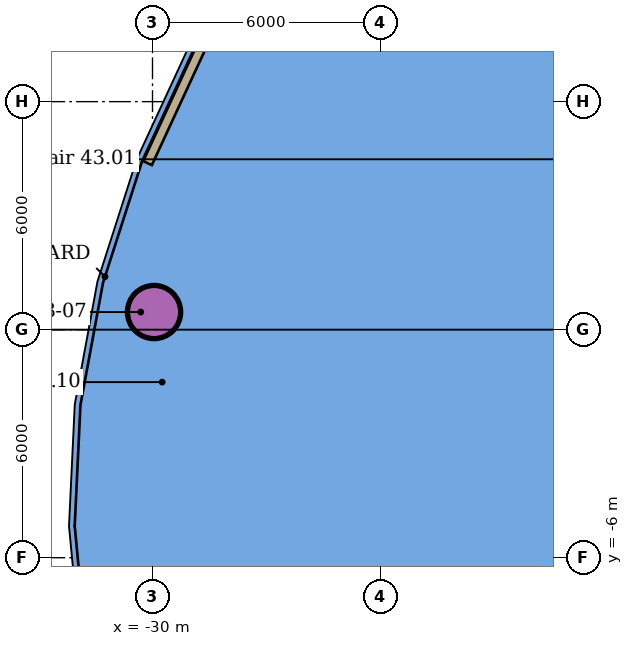
"""IFC4 building model, lengths in metres.
Left out: names, types, materials, properties, quantities, classifications, styles, units other than length and angle.
Written with IfcOpenShell. Run it as: python <this file> out.ifc"""

import sys

from ifc_helpers import new_model, si_unit, direction, frame, frame_2d, origin, origin_2d, place, context, subcontext, project, spatial, rectangle, hollow_circle, extrude, element, save


model = new_model("IFC4")
c1 = context("Model", 3, precision=1e-05, world=origin(), true_north=direction((0.0, 1.0)))
c2 = subcontext(c1, "Body", "Model", "MODEL_VIEW")
j1 = project(units=[si_unit("LENGTHUNIT", "METRE"), si_unit("PLANEANGLEUNIT", "RADIAN")], contexts=[c1])
p1 = place(None, origin())
s1 = spatial("IfcSite", under=j1, at=p1, CompositionType="ELEMENT")
p2 = place(p1, origin())
s2 = spatial("IfcBuilding", under=s1, at=p2, CompositionType="ELEMENT")
p3 = place(p2, frame((0.0, 0.0, 179.4)))
s3 = spatial("IfcBuildingStorey", under=s2, at=p3, CompositionType="ELEMENT", Elevation=179.4)
p4 = place(p3, frame((-29.959, 0.464, 0.0), z_axis=(0.0, 0.0, 1.0), x_axis=(1.0, 0.0, 0.0)))
e1 = element("IfcColumn", 1, at=p4, inside=s3, PredefinedType="COLUMN", context=c2, shape_type="SweptSolid", body=[
    extrude(hollow_circle(Radius=0.7, WallThickness=0.05, at=origin_2d()), origin(), (0.0, 0.0, 1.0), 3.45),
])
p5 = place(p3, frame((-28.705, 7.466, 0.0), z_axis=(0.0, 0.0, 1.0), x_axis=(-0.419696101817, -0.90766468595, 0.0)))
e2 = element("IfcWall", 2, at=p5, inside=s3, PredefinedType="SOLIDWALL", context=c2, shape_type="SweptSolid", body=[
    extrude(rectangle(XDim=3.397, YDim=0.25, at=frame_2d((1.699, 0.0))), origin(), (0.0, 0.0, 1.0), 3.45),
])
save(model, sys.argv[1])
